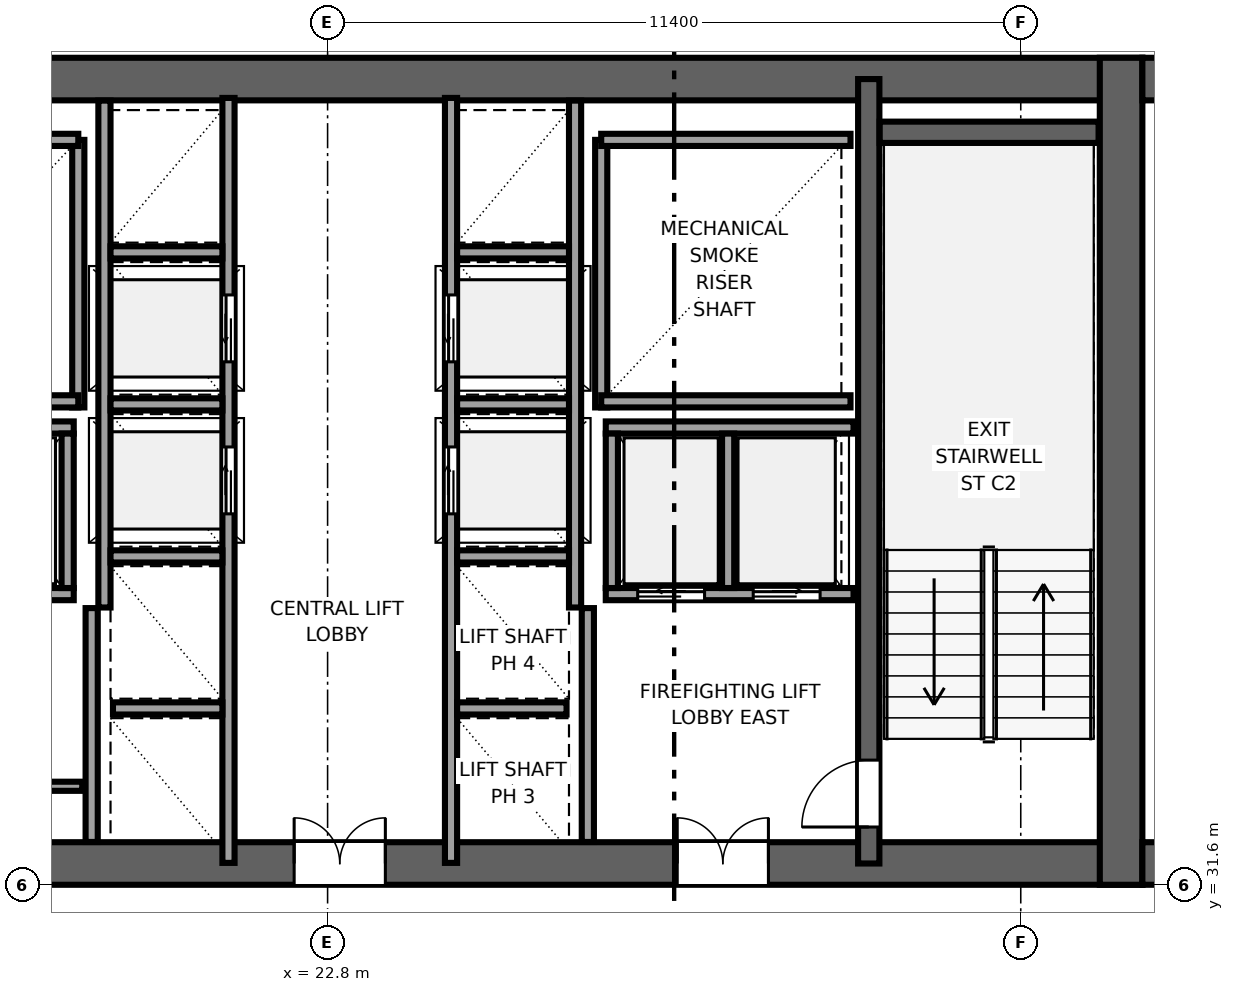
"""IFC4 building model, lengths in metres.
Left out: names, types, materials, properties, quantities, classifications, styles, units other than length and angle.
Written with IfcOpenShell. Run it as: python <this file> out.ifc"""

import sys

from ifc_helpers import new_model, si_unit, direction, frame, frame_2d, origin, place, context, subcontext, project, spatial, rectangle, extrude, source, transform, mapped, element, fill, save


model = new_model("IFC4")
c1 = context("Model", 3, precision=1e-05, world=origin(), true_north=direction((0.0, 1.0)))
c2 = subcontext(c1, "Body", "Model", "MODEL_VIEW")
j1 = project(units=[si_unit("LENGTHUNIT", "METRE"), si_unit("PLANEANGLEUNIT", "RADIAN")], contexts=[c1])
p1 = place(None, origin())
s1 = spatial("IfcSite", under=j1, at=p1, CompositionType="ELEMENT")
p2 = place(p1, origin())
s2 = spatial("IfcBuilding", under=s1, at=p2, CompositionType="ELEMENT")
p3 = place(p2, frame((0.0, 0.0, 187.55)))
s3 = spatial("IfcBuildingStorey", under=s2, at=p3, CompositionType="ELEMENT", Elevation=187.55)
p4 = place(p3, frame((9.8, 31.95, 0.0), z_axis=(0.0, 0.0, 1.0), x_axis=(1.0, 0.0, 0.0)))
e1 = element("IfcWall", 1, at=p4, inside=s3, PredefinedType="SHEAR", context=c2, shape_type="SweptSolid", body=[
    extrude(rectangle(XDim=26.4, YDim=0.7, at=frame_2d((13.2, 0.0))), origin(), (0.0, 0.0, 1.0), 3.55),
])
p5 = place(p4, frame((6.32, 0.0, 0.0), z_axis=(0.0, 0.0, 1.0), x_axis=(-1.0, 0.0, 0.0)))
e2 = element("IfcOpeningElement", 2, at=p5, cuts=e1, PredefinedType="OPENING", context=c2, shape_type="SweptSolid", body=[
    extrude(rectangle(XDim=1.5, YDim=2.04, at=frame_2d((0.75, 1.02))), frame((0.0, 0.36, 0.0), z_axis=(0.0, -1.0, 0.0), x_axis=(1.0, 0.0, 0.0)), (0.0, 0.0, 1.0), 0.72),
])
p6 = place(p4, frame((13.95, 0.0, 0.0), z_axis=(0.0, 0.0, 1.0), x_axis=(-1.0, 0.0, 0.0)))
e3 = element("IfcOpeningElement", 3, at=p6, cuts=e1, PredefinedType="OPENING", context=c2, shape_type="SweptSolid", body=[
    extrude(rectangle(XDim=1.5, YDim=2.04, at=frame_2d((0.75, 1.02))), frame((0.0, 0.36, 0.0), z_axis=(0.0, -1.0, 0.0), x_axis=(1.0, 0.0, 0.0)), (0.0, 0.0, 1.0), 0.72),
])
p7 = place(p4, frame((20.25, 0.0, 0.0), z_axis=(0.0, 0.0, 1.0), x_axis=(-1.0, 0.0, 0.0)))
e4 = element("IfcOpeningElement", 4, at=p7, cuts=e1, PredefinedType="OPENING", context=c2, shape_type="SweptSolid", body=[
    extrude(rectangle(XDim=1.5, YDim=2.04, at=frame_2d((0.75, 1.02))), frame((0.0, 0.36, 0.0), z_axis=(0.0, -1.0, 0.0), x_axis=(1.0, 0.0, 0.0)), (0.0, 0.0, 1.0), 0.72),
])
p8 = place(p4, frame((8.37, 0.0, 0.0), z_axis=(0.0, 0.0, 1.0), x_axis=(-1.0, 0.0, 0.0)))
e5 = element("IfcOpeningElement", 5, at=p8, cuts=e1, PredefinedType="OPENING", context=c2, shape_type="SweptSolid", body=[
    extrude(rectangle(XDim=0.82, YDim=2.01, at=frame_2d((0.41, 1.005))), frame((0.0, 0.36, 0.0), z_axis=(0.0, -1.0, 0.0), x_axis=(1.0, 0.0, 0.0)), (0.0, 0.0, 1.0), 0.72),
])
p9 = place(p3, frame((9.8, 44.85, 0.0), z_axis=(0.0, 0.0, 1.0), x_axis=(1.0, 0.0, 0.0)))
e6 = element("IfcWall", 6, at=p9, inside=s3, PredefinedType="SHEAR", context=c2, shape_type="SweptSolid", body=[
    extrude(rectangle(XDim=26.4, YDim=0.7, at=frame_2d((13.2, 0.0))), origin(), (0.0, 0.0, 1.0), 3.55),
])
p10 = place(p3, frame((35.85, 31.6, 0.0), z_axis=(0.0, 0.0, 1.0), x_axis=(0.0, 1.0, 0.0)))
e7 = element("IfcWall", 7, at=p10, inside=s3, PredefinedType="SHEAR", context=c2, shape_type="SweptSolid", body=[
    extrude(rectangle(XDim=13.6, YDim=0.7, at=frame_2d((6.8, 0.0))), origin(), (0.0, 0.0, 1.0), 3.55),
])
p11 = place(p3, frame((31.7, 31.95, 0.0), z_axis=(0.0, 0.0, 1.0), x_axis=(0.0, 1.0, 0.0)))
e8 = element("IfcWall", 8, at=p11, inside=s3, PredefinedType="SHEAR", context=c2, shape_type="SweptSolid", body=[
    extrude(rectangle(XDim=12.9, YDim=0.35, at=frame_2d((6.45, 0.0))), origin(), (0.0, 0.0, 1.0), 3.55),
])
p12 = place(p11, frame((1.7, 0.0, 0.0), z_axis=(0.0, 0.0, 1.0), x_axis=(-1.0, 0.0, 0.0)))
e9 = element("IfcOpeningElement", 9, at=p12, cuts=e8, PredefinedType="OPENING", context=c2, shape_type="SweptSolid", body=[
    extrude(rectangle(XDim=1.1, YDim=2.12, at=frame_2d((0.55, 1.06))), frame((0.0, 0.185, 0.0), z_axis=(0.0, -1.0, 0.0), x_axis=(1.0, 0.0, 0.0)), (0.0, 0.0, 1.0), 0.37),
])
p13 = place(p3, frame((36.2, 31.95, 0.0), z_axis=(0.0, 0.0, 1.0), x_axis=(1.0, 0.0, 0.0)))
e10 = element("IfcWall", 10, at=p13, inside=s3, PredefinedType="SHEAR", context=c2, shape_type="SweptSolid", body=[
    extrude(rectangle(XDim=4.2, YDim=0.7, at=frame_2d((2.1, 0.0))), origin(), (0.0, 0.0, 1.0), 3.55),
])
p14 = place(p13, frame((1.34, 0.0, 0.0), z_axis=(0.0, 0.0, 1.0), x_axis=(-1.0, 0.0, 0.0)))
e11 = element("IfcOpeningElement", 11, at=p14, cuts=e10, PredefinedType="OPENING", context=c2, shape_type="SweptSolid", body=[
    extrude(rectangle(XDim=1.02, YDim=2.03, at=frame_2d((0.51, 1.015))), frame((0.0, 0.36, 0.0), z_axis=(0.0, -1.0, 0.0), x_axis=(1.0, 0.0, 0.0)), (0.0, 0.0, 1.0), 0.72),
])
p15 = place(p3, frame((36.2, 44.85, 0.0), z_axis=(0.0, 0.0, 1.0), x_axis=(1.0, 0.0, 0.0)))
e12 = element("IfcWall", 12, at=p15, inside=s3, PredefinedType="SHEAR", context=c2, shape_type="SweptSolid", body=[
    extrude(rectangle(XDim=4.2, YDim=0.7, at=frame_2d((2.1, 0.0))), origin(), (0.0, 0.0, 1.0), 3.55),
])
p16 = place(p3, frame((31.88, 43.975, 0.0), z_axis=(0.0, 0.0, 1.0), x_axis=(1.0, 0.0, 0.0)))
e13 = element("IfcWall", 13, at=p16, inside=s3, PredefinedType="SHEAR", context=c2, shape_type="SweptSolid", body=[
    extrude(rectangle(XDim=3.6, YDim=0.35, at=frame_2d((1.8, 0.0))), origin(), (0.0, 0.0, 1.0), 3.55),
])
p17 = place(p3, frame((18.7, 39.45, 0.0), z_axis=(0.0, 0.0, 1.0), x_axis=(0.0, 1.0, 0.0)))
e14 = element("IfcWall", 14, at=p17, inside=s3, PredefinedType="SOLIDWALL", context=c2, shape_type="SweptSolid", body=[
    extrude(rectangle(XDim=4.4, YDim=0.2, at=frame_2d((2.2, 0.0))), origin(), (0.0, 0.0, 1.0), 3.37),
])
for number, where, z_axis, x_axis in (
    (15, (14.6, 39.55, 0.0), (0.0, 0.0, 1.0), (1.0, 0.0, 0.0)),
    (16, (14.6, 43.85, 0.0), (0.0, 0.0, 1.0), (1.0, 0.0, 0.0)),
):
    element("IfcWall", number, at=place(p3, frame(where, z_axis=z_axis, x_axis=x_axis)), inside=s3, PredefinedType="SOLIDWALL", context=c2, shape_type="SweptSolid", body=[
        extrude(rectangle(XDim=4.1, YDim=0.2, at=frame_2d((2.05, 0.0))), origin(), (0.0, 0.0, 1.0), 3.37),
    ])
p18 = place(p3, frame((27.3, 39.45, 0.0), z_axis=(0.0, 0.0, 1.0), x_axis=(0.0, 1.0, 0.0)))
e17 = element("IfcWall", 17, at=p18, inside=s3, PredefinedType="SOLIDWALL", context=c2, shape_type="SweptSolid", body=[
    extrude(rectangle(XDim=4.4, YDim=0.2, at=frame_2d((2.2, 0.0))), origin(), (0.0, 0.0, 1.0), 3.37),
])
for number, where, z_axis, x_axis in (
    (18, (27.3, 39.55, 0.0), (0.0, 0.0, 1.0), (1.0, 0.0, 0.0)),
    (19, (27.3, 43.85, 0.0), (0.0, 0.0, 1.0), (1.0, 0.0, 0.0)),
):
    element("IfcWall", number, at=place(p3, frame(where, z_axis=z_axis, x_axis=x_axis)), inside=s3, PredefinedType="SOLIDWALL", context=c2, shape_type="SweptSolid", body=[
        extrude(rectangle(XDim=4.1, YDim=0.2, at=frame_2d((2.05, 0.0))), origin(), (0.0, 0.0, 1.0), 3.37),
    ])
for number, where, z_axis, x_axis in (
    (20, (18.92, 32.304, 0.0), (0.0, 0.0, 1.0), (0.0, 1.0, 0.0)),
    (21, (27.08, 32.304, 0.0), (0.0, 0.0, 1.0), (0.0, 1.0, 0.0)),
):
    element("IfcWall", number, at=place(p3, frame(where, z_axis=z_axis, x_axis=x_axis)), inside=s3, PredefinedType="SOLIDWALL", context=c2, shape_type="SweptSolid", body=[
        extrude(rectangle(XDim=3.846, YDim=0.2, at=frame_2d((1.923, 0.0))), origin(), (0.0, 0.0, 1.0), 3.37),
    ])
p19 = place(p3, frame((21.17, 31.96, 0.0), z_axis=(0.0, 0.0, 1.0), x_axis=(0.0, 1.0, 0.0)))
e22 = element("IfcWall", 22, at=p19, inside=s3, PredefinedType="SOLIDWALL", context=c2, shape_type="SweptSolid", body=[
    extrude(rectangle(XDim=12.58, YDim=0.2, at=frame_2d((6.29, 0.0))), origin(), (0.0, 0.0, 1.0), 3.37),
])
p20 = place(p19, frame((5.74, 0.0, 0.0)))
e23 = element("IfcOpeningElement", 23, at=p20, cuts=e22, PredefinedType="OPENING", context=c2, shape_type="SweptSolid", body=[
    extrude(rectangle(XDim=1.1, YDim=2.12, at=frame_2d((0.55, 1.06))), frame((0.0, 0.11, 0.0), z_axis=(0.0, -1.0, 0.0), x_axis=(1.0, 0.0, 0.0)), (0.0, 0.0, 1.0), 0.22),
])
p21 = place(p19, frame((8.24, 0.0, 0.0)))
e24 = element("IfcOpeningElement", 24, at=p21, cuts=e22, PredefinedType="OPENING", context=c2, shape_type="SweptSolid", body=[
    extrude(rectangle(XDim=1.1, YDim=2.12, at=frame_2d((0.55, 1.06))), frame((0.0, 0.11, 0.0), z_axis=(0.0, -1.0, 0.0), x_axis=(1.0, 0.0, 0.0)), (0.0, 0.0, 1.0), 0.22),
])
p22 = place(p3, frame((19.13, 36.16, 0.0), z_axis=(0.0, 0.0, 1.0), x_axis=(0.0, 1.0, 0.0)))
e25 = element("IfcWall", 25, at=p22, inside=s3, PredefinedType="SOLIDWALL", context=c2, shape_type="SweptSolid", body=[
    extrude(rectangle(XDim=8.336, YDim=0.2, at=frame_2d((4.168, 0.0))), origin(), (0.0, 0.0, 1.0), 3.37),
])
p23 = place(p3, frame((19.27, 34.5, 0.0), z_axis=(0.0, 0.0, 1.0), x_axis=(1.0, 0.0, 0.0)))
e26 = element("IfcWall", 26, at=p23, inside=s3, PredefinedType="SOLIDWALL", context=c2, shape_type="SweptSolid", body=[
    extrude(rectangle(XDim=1.8, YDim=0.2, at=frame_2d((0.9, 0.0))), origin(), (0.0, 0.0, 1.0), 3.37),
])
for number, where, z_axis, x_axis in (
    (27, (19.23, 37.0, 0.0), (0.0, 0.0, 1.0), (1.0, 0.0, 0.0)),
    (28, (19.23, 39.5, 0.0), (0.0, 0.0, 1.0), (1.0, 0.0, 0.0)),
    (29, (19.23, 42.0, 0.0), (0.0, 0.0, 1.0), (1.0, 0.0, 0.0)),
):
    element("IfcWall", number, at=place(p3, frame(where, z_axis=z_axis, x_axis=x_axis)), inside=s3, PredefinedType="SOLIDWALL", context=c2, shape_type="SweptSolid", body=[
        extrude(rectangle(XDim=1.84, YDim=0.2, at=frame_2d((0.92, 0.0))), origin(), (0.0, 0.0, 1.0), 3.37),
    ])
p24 = place(p3, frame((27.375, 36.38, 0.0), z_axis=(0.0, 0.0, 1.0), x_axis=(1.0, 0.0, 0.0)))
e30 = element("IfcWall", 30, at=p24, inside=s3, PredefinedType="SOLIDWALL", context=c2, shape_type="SweptSolid", body=[
    extrude(rectangle(XDim=4.075, YDim=0.2, at=frame_2d((2.038, 0.0))), origin(), (0.0, 0.0, 1.0), 3.37),
])
p25 = place(p24, frame((0.525, 0.0, 0.0)))
e31 = element("IfcOpeningElement", 31, at=p25, cuts=e30, PredefinedType="OPENING", context=c2, shape_type="SweptSolid", body=[
    extrude(rectangle(XDim=1.1, YDim=2.12, at=frame_2d((0.55, 1.06))), frame((0.0, 0.11, 0.0), z_axis=(0.0, -1.0, 0.0), x_axis=(1.0, 0.0, 0.0)), (0.0, 0.0, 1.0), 0.22),
])
p26 = place(p24, frame((2.425, 0.0, 0.0)))
e32 = element("IfcOpeningElement", 32, at=p26, cuts=e30, PredefinedType="OPENING", context=c2, shape_type="SweptSolid", body=[
    extrude(rectangle(XDim=1.1, YDim=2.12, at=frame_2d((0.55, 1.06))), frame((0.0, 0.11, 0.0), z_axis=(0.0, -1.0, 0.0), x_axis=(1.0, 0.0, 0.0)), (0.0, 0.0, 1.0), 0.22),
])
p27 = place(p3, frame((27.375, 39.12, 0.0), z_axis=(0.0, 0.0, 1.0), x_axis=(1.0, 0.0, 0.0)))
e33 = element("IfcWall", 33, at=p27, inside=s3, PredefinedType="SOLIDWALL", context=c2, shape_type="SweptSolid", body=[
    extrude(rectangle(XDim=4.075, YDim=0.2, at=frame_2d((2.038, 0.0))), origin(), (0.0, 0.0, 1.0), 3.37),
])
for number, where, z_axis, x_axis in (
    (34, (27.475, 36.48, 0.0), (0.0, 0.0, 1.0), (0.0, 1.0, 0.0)),
    (35, (29.387, 36.48, 0.0), (0.0, 0.0, 1.0), (0.0, 1.0, 0.0)),
):
    element("IfcWall", number, at=place(p3, frame(where, z_axis=z_axis, x_axis=x_axis)), inside=s3, PredefinedType="SOLIDWALL", context=c2, shape_type="SweptSolid", body=[
        extrude(rectangle(XDim=2.54, YDim=0.2, at=frame_2d((1.27, 0.0))), origin(), (0.0, 0.0, 1.0), 3.37),
    ])
p28 = place(p3, frame((14.55, 36.38, 0.0), z_axis=(0.0, 0.0, 1.0), x_axis=(1.0, 0.0, 0.0)))
e36 = element("IfcWall", 36, at=p28, inside=s3, PredefinedType="SOLIDWALL", context=c2, shape_type="SweptSolid", body=[
    extrude(rectangle(XDim=4.075, YDim=0.2, at=frame_2d((2.038, 0.0))), origin(), (0.0, 0.0, 1.0), 3.37),
])
p29 = place(p28, frame((0.55, 0.0, 0.0)))
e37 = element("IfcOpeningElement", 37, at=p29, cuts=e36, PredefinedType="OPENING", context=c2, shape_type="SweptSolid", body=[
    extrude(rectangle(XDim=1.1, YDim=2.12, at=frame_2d((0.55, 1.06))), frame((0.0, 0.11, 0.0), z_axis=(0.0, -1.0, 0.0), x_axis=(1.0, 0.0, 0.0)), (0.0, 0.0, 1.0), 0.22),
])
p30 = place(p28, frame((2.45, 0.0, 0.0)))
e38 = element("IfcOpeningElement", 38, at=p30, cuts=e36, PredefinedType="OPENING", context=c2, shape_type="SweptSolid", body=[
    extrude(rectangle(XDim=1.1, YDim=2.12, at=frame_2d((0.55, 1.06))), frame((0.0, 0.11, 0.0), z_axis=(0.0, -1.0, 0.0), x_axis=(1.0, 0.0, 0.0)), (0.0, 0.0, 1.0), 0.22),
])
p31 = place(p3, frame((14.55, 39.12, 0.0), z_axis=(0.0, 0.0, 1.0), x_axis=(1.0, 0.0, 0.0)))
e39 = element("IfcWall", 39, at=p31, inside=s3, PredefinedType="SOLIDWALL", context=c2, shape_type="SweptSolid", body=[
    extrude(rectangle(XDim=4.075, YDim=0.2, at=frame_2d((2.038, 0.0))), origin(), (0.0, 0.0, 1.0), 3.37),
])
p32 = place(p3, frame((18.525, 36.48, 0.0), z_axis=(0.0, 0.0, 1.0), x_axis=(0.0, 1.0, 0.0)))
e40 = element("IfcWall", 40, at=p32, inside=s3, PredefinedType="SOLIDWALL", context=c2, shape_type="SweptSolid", body=[
    extrude(rectangle(XDim=2.54, YDim=0.2, at=frame_2d((1.27, 0.0))), origin(), (0.0, 0.0, 1.0), 3.37),
])
p33 = place(p3, frame((24.83, 31.96, 0.0), z_axis=(0.0, 0.0, 1.0), x_axis=(0.0, 1.0, 0.0)))
e41 = element("IfcWall", 41, at=p33, inside=s3, PredefinedType="SOLIDWALL", context=c2, shape_type="SweptSolid", body=[
    extrude(rectangle(XDim=12.58, YDim=0.2, at=frame_2d((6.29, 0.0))), origin(), (0.0, 0.0, 1.0), 3.37),
])
p34 = place(p33, frame((5.74, 0.0, 0.0)))
e42 = element("IfcOpeningElement", 42, at=p34, cuts=e41, PredefinedType="OPENING", context=c2, shape_type="SweptSolid", body=[
    extrude(rectangle(XDim=1.1, YDim=2.12, at=frame_2d((0.55, 1.06))), frame((0.0, 0.11, 0.0), z_axis=(0.0, -1.0, 0.0), x_axis=(1.0, 0.0, 0.0)), (0.0, 0.0, 1.0), 0.22),
])
p35 = place(p33, frame((8.24, 0.0, 0.0)))
e43 = element("IfcOpeningElement", 43, at=p35, cuts=e41, PredefinedType="OPENING", context=c2, shape_type="SweptSolid", body=[
    extrude(rectangle(XDim=1.1, YDim=2.12, at=frame_2d((0.55, 1.06))), frame((0.0, 0.11, 0.0), z_axis=(0.0, -1.0, 0.0), x_axis=(1.0, 0.0, 0.0)), (0.0, 0.0, 1.0), 0.22),
])
p36 = place(p3, frame((26.87, 36.16, 0.0), z_axis=(0.0, 0.0, 1.0), x_axis=(0.0, 1.0, 0.0)))
e44 = element("IfcWall", 44, at=p36, inside=s3, PredefinedType="SOLIDWALL", context=c2, shape_type="SweptSolid", body=[
    extrude(rectangle(XDim=8.336, YDim=0.2, at=frame_2d((4.168, 0.0))), origin(), (0.0, 0.0, 1.0), 3.37),
])
p37 = place(p3, frame((24.93, 34.5, 0.0), z_axis=(0.0, 0.0, 1.0), x_axis=(1.0, 0.0, 0.0)))
e45 = element("IfcWall", 45, at=p37, inside=s3, PredefinedType="SOLIDWALL", context=c2, shape_type="SweptSolid", body=[
    extrude(rectangle(XDim=1.8, YDim=0.2, at=frame_2d((0.9, 0.0))), origin(), (0.0, 0.0, 1.0), 3.37),
])
for number, where, z_axis, x_axis in (
    (46, (24.93, 37.0, 0.0), (0.0, 0.0, 1.0), (1.0, 0.0, 0.0)),
    (47, (24.93, 39.5, 0.0), (0.0, 0.0, 1.0), (1.0, 0.0, 0.0)),
    (48, (24.93, 42.0, 0.0), (0.0, 0.0, 1.0), (1.0, 0.0, 0.0)),
):
    element("IfcWall", number, at=place(p3, frame(where, z_axis=z_axis, x_axis=x_axis)), inside=s3, PredefinedType="SOLIDWALL", context=c2, shape_type="SweptSolid", body=[
        extrude(rectangle(XDim=1.84, YDim=0.2, at=frame_2d((0.92, 0.0))), origin(), (0.0, 0.0, 1.0), 3.37),
    ])
p38 = place(p3, frame((16.28, 33.22, 0.0), z_axis=(0.0, 0.0, 1.0), x_axis=(1.0, 0.0, 0.0)))
e49 = element("IfcWall", 49, at=p38, inside=s3, PredefinedType="PARTITIONING", context=c2, shape_type="SweptSolid", body=[
    extrude(rectangle(XDim=2.485, YDim=0.15, at=frame_2d((1.242, 0.0))), origin(), (0.0, 0.0, 1.0), 3.37),
])
m1 = source(origin(), c2, "Body", "SweptSolid", [
    extrude(rectangle(XDim=1.1, YDim=2.12, at=frame_2d((0.55, 1.06))), frame((0.0, 0.025, 0.0), z_axis=(0.0, -1.0, 0.0), x_axis=(1.0, 0.0, 0.0)), (0.0, 0.0, 1.0), 0.05),
])
p39 = place(p12, origin())
e50 = element("IfcDoor", 50, at=p39, inside=s3, OperationType="SINGLE_SWING_LEFT", PredefinedType="DOOR", context=c2, shape_type="MappedRepresentation", body=[
    mapped(m1, transform((0.0, 0.0, 0.0), x_axis=(1.0, 0.0, 0.0), y_axis=(0.0, 1.0, 0.0), z_axis=(0.0, 0.0, 1.0), scale=1.0)),
])
fill(e9, e50)
m2 = source(origin(), c2, "Body", "SweptSolid", [
    extrude(rectangle(XDim=1.5, YDim=2.04, at=frame_2d((0.75, 1.02))), frame((0.0, 0.025, 0.0), z_axis=(0.0, -1.0, 0.0), x_axis=(1.0, 0.0, 0.0)), (0.0, 0.0, 1.0), 0.05),
])
p40 = place(p6, origin())
e51 = element("IfcDoor", 51, at=p40, inside=s3, OperationType="DOUBLE_DOOR_SINGLE_SWING", PredefinedType="DOOR", context=c2, shape_type="MappedRepresentation", body=[
    mapped(m2, transform((0.0, 0.0, 0.0), x_axis=(1.0, 0.0, 0.0), y_axis=(0.0, 1.0, 0.0), z_axis=(0.0, 0.0, 1.0), scale=1.0)),
])
fill(e3, e51)
p41 = place(p7, origin())
e52 = element("IfcDoor", 52, at=p41, inside=s3, OperationType="DOUBLE_DOOR_SINGLE_SWING", PredefinedType="DOOR", context=c2, shape_type="MappedRepresentation", body=[
    mapped(m2, transform((0.0, 0.0, 0.0), x_axis=(1.0, 0.0, 0.0), y_axis=(0.0, 1.0, 0.0), z_axis=(0.0, 0.0, 1.0), scale=1.0)),
])
fill(e4, e52)
m3 = source(origin(), c2, "Body", "SweptSolid", [
    extrude(rectangle(XDim=1.1, YDim=2.12, at=frame_2d((0.55, 1.06))), frame((0.0, 0.025, 0.0), z_axis=(0.0, -1.0, 0.0), x_axis=(1.0, 0.0, 0.0)), (0.0, 0.0, 1.0), 0.05),
])
p42 = place(p20, origin())
e53 = element("IfcDoor", 53, at=p42, inside=s3, OperationType="SLIDING_TO_RIGHT", PredefinedType="DOOR", context=c2, shape_type="MappedRepresentation", body=[
    mapped(m3, transform((0.0, 0.0, 0.0), x_axis=(1.0, 0.0, 0.0), y_axis=(0.0, 1.0, 0.0), z_axis=(0.0, 0.0, 1.0), scale=1.0)),
])
fill(e23, e53)
p43 = place(p21, origin())
e54 = element("IfcDoor", 54, at=p43, inside=s3, OperationType="SLIDING_TO_LEFT", PredefinedType="DOOR", context=c2, shape_type="MappedRepresentation", body=[
    mapped(m3, transform((0.0, 0.0, 0.0), x_axis=(1.0, 0.0, 0.0), y_axis=(0.0, 1.0, 0.0), z_axis=(0.0, 0.0, 1.0), scale=1.0)),
])
fill(e24, e54)
p44 = place(p25, origin())
e55 = element("IfcDoor", 55, at=p44, inside=s3, OperationType="SLIDING_TO_LEFT", PredefinedType="DOOR", context=c2, shape_type="MappedRepresentation", body=[
    mapped(m3, transform((0.0, 0.0, 0.0), x_axis=(1.0, 0.0, 0.0), y_axis=(0.0, 1.0, 0.0), z_axis=(0.0, 0.0, 1.0), scale=1.0)),
])
fill(e31, e55)
p45 = place(p26, origin())
e56 = element("IfcDoor", 56, at=p45, inside=s3, OperationType="SLIDING_TO_RIGHT", PredefinedType="DOOR", context=c2, shape_type="MappedRepresentation", body=[
    mapped(m3, transform((0.0, 0.0, 0.0), x_axis=(1.0, 0.0, 0.0), y_axis=(0.0, 1.0, 0.0), z_axis=(0.0, 0.0, 1.0), scale=1.0)),
])
fill(e32, e56)
p46 = place(p34, origin())
e57 = element("IfcDoor", 57, at=p46, inside=s3, OperationType="SLIDING_TO_RIGHT", PredefinedType="DOOR", context=c2, shape_type="MappedRepresentation", body=[
    mapped(m3, transform((0.0, 0.0, 0.0), x_axis=(1.0, 0.0, 0.0), y_axis=(0.0, 1.0, 0.0), z_axis=(0.0, 0.0, 1.0), scale=1.0)),
])
fill(e42, e57)
p47 = place(p35, origin())
e58 = element("IfcDoor", 58, at=p47, inside=s3, OperationType="SLIDING_TO_LEFT", PredefinedType="DOOR", context=c2, shape_type="MappedRepresentation", body=[
    mapped(m3, transform((0.0, 0.0, 0.0), x_axis=(1.0, 0.0, 0.0), y_axis=(0.0, 1.0, 0.0), z_axis=(0.0, 0.0, 1.0), scale=1.0)),
])
fill(e43, e58)
save(model, sys.argv[1])
